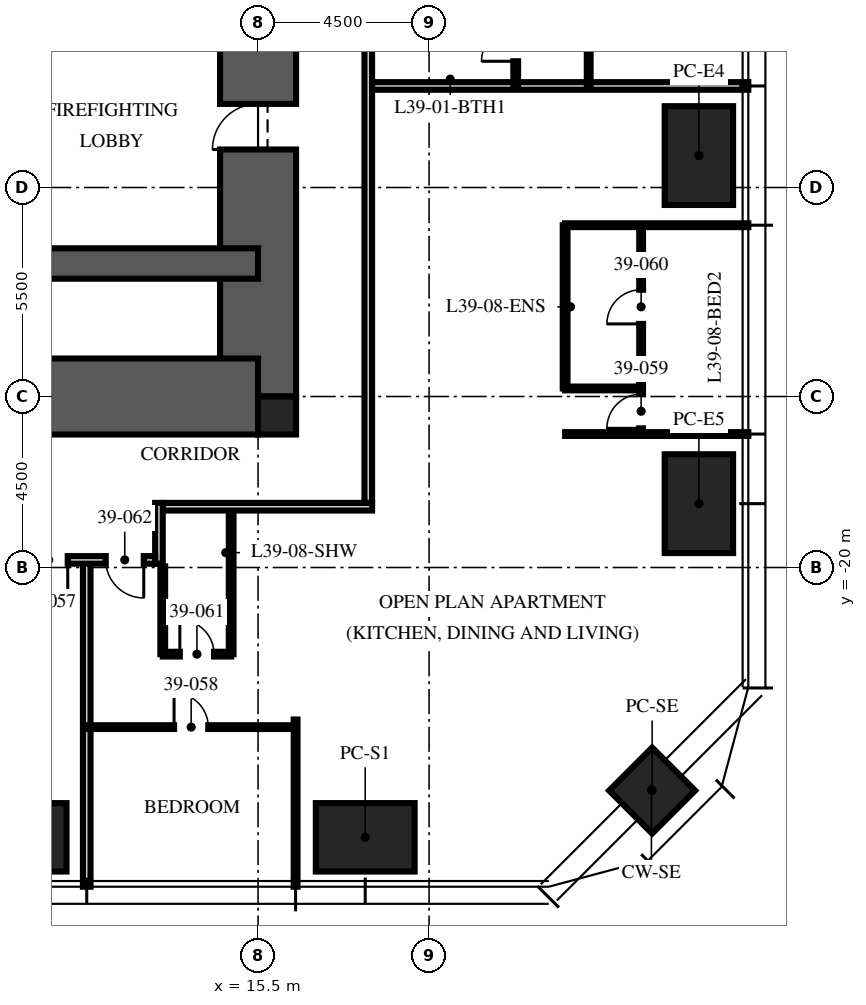
"""IFC4 building model, lengths in metres.
Left out: names, types, materials, properties, quantities, classifications, styles, units other than length and angle.
Written with IfcOpenShell. Run it as: python <this file> out.ifc"""

import sys

from ifc_helpers import new_model, si_unit, direction, frame, frame_2d, origin, origin_2d, place, context, subcontext, project, spatial, rectangle, extrude, element, fill, save


model = new_model("IFC4")
c1 = context("Model", 3, precision=1e-05, world=origin(), true_north=direction((0.0, 1.0)))
c2 = subcontext(c1, "Body", "Model", "MODEL_VIEW")
j1 = project(units=[si_unit("LENGTHUNIT", "METRE"), si_unit("PLANEANGLEUNIT", "RADIAN")], contexts=[c1])
p1 = place(None, origin())
s1 = spatial("IfcSite", under=j1, at=p1, CompositionType="ELEMENT")
p2 = place(p1, origin())
s2 = spatial("IfcBuilding", under=s1, at=p2, CompositionType="ELEMENT")
p3 = place(p2, frame((0.0, 0.0, 156.0)))
s3 = spatial("IfcBuildingStorey", under=s2, at=p3, CompositionType="ELEMENT", Elevation=156.0)
p4 = place(p3, frame((15.5, -15.5, -0.25), z_axis=(0.0, 0.0, 1.0), x_axis=(0.0, 1.0, 0.0)))
e1 = element("IfcWall", 1, at=p4, inside=s3, PredefinedType="SHEAR", context=c2, shape_type="SweptSolid", body=[
    extrude(rectangle(XDim=31.0, YDim=2.0, at=frame_2d((15.5, 0.0))), origin(), (0.0, 0.0, 1.0), 3.75),
])
p5 = place(p4, frame((6.5, 0.0, 0.25)))
e2 = element("IfcOpeningElement", 2, at=p5, cuts=e1, PredefinedType="OPENING", context=c2, shape_type="SweptSolid", body=[
    extrude(rectangle(XDim=1.2, YDim=2.1, at=frame_2d((0.6, 1.05))), frame((0.0, 1.01, 0.0), z_axis=(0.0, -1.0, 0.0), x_axis=(1.0, 0.0, 0.0)), (0.0, 0.0, 1.0), 2.02),
])
p6 = place(p4, frame((23.0, 0.0, 0.25)))
e3 = element("IfcOpeningElement", 3, at=p6, cuts=e1, PredefinedType="OPENING", context=c2, shape_type="SweptSolid", body=[
    extrude(rectangle(XDim=1.8, YDim=2.1, at=frame_2d((0.9, 1.05))), frame((0.0, 1.01, 0.0), z_axis=(0.0, -1.0, 0.0), x_axis=(1.0, 0.0, 0.0)), (0.0, 0.0, 1.0), 2.02),
])
p7 = place(p3, frame((-15.5, -15.5, -0.25), z_axis=(0.0, 0.0, 1.0), x_axis=(1.0, 0.0, 0.0)))
e4 = element("IfcWall", 4, at=p7, inside=s3, PredefinedType="SHEAR", context=c2, shape_type="SweptSolid", body=[
    extrude(rectangle(XDim=31.0, YDim=2.0, at=frame_2d((15.5, 0.0))), origin(), (0.0, 0.0, 1.0), 3.75),
])
p8 = place(p7, frame((10.4, 0.0, 0.25)))
e5 = element("IfcOpeningElement", 5, at=p8, cuts=e4, PredefinedType="OPENING", context=c2, shape_type="SweptSolid", body=[
    extrude(rectangle(XDim=1.1, YDim=2.1, at=frame_2d((0.55, 1.05))), frame((0.0, 1.01, 0.0), z_axis=(0.0, -1.0, 0.0), x_axis=(1.0, 0.0, 0.0)), (0.0, 0.0, 1.0), 2.02),
])
p9 = place(p7, frame((13.5, 0.0, 0.25)))
e6 = element("IfcOpeningElement", 6, at=p9, cuts=e4, PredefinedType="OPENING", context=c2, shape_type="SweptSolid", body=[
    extrude(rectangle(XDim=1.1, YDim=2.1, at=frame_2d((0.55, 1.05))), frame((0.0, 1.01, 0.0), z_axis=(0.0, -1.0, 0.0), x_axis=(1.0, 0.0, 0.0)), (0.0, 0.0, 1.0), 2.02),
])
p10 = place(p7, frame((16.6, 0.0, 0.25)))
e7 = element("IfcOpeningElement", 7, at=p10, cuts=e4, PredefinedType="OPENING", context=c2, shape_type="SweptSolid", body=[
    extrude(rectangle(XDim=1.1, YDim=2.1, at=frame_2d((0.55, 1.05))), frame((0.0, 1.01, 0.0), z_axis=(0.0, -1.0, 0.0), x_axis=(1.0, 0.0, 0.0)), (0.0, 0.0, 1.0), 2.02),
])
p11 = place(p3, frame((-15.5, -12.0, -0.25), z_axis=(0.0, 0.0, 1.0), x_axis=(1.0, 0.0, 0.0)))
e8 = element("IfcWall", 8, at=p11, inside=s3, PredefinedType="SHEAR", context=c2, shape_type="SweptSolid", body=[
    extrude(rectangle(XDim=31.0, YDim=0.8, at=frame_2d((15.5, 0.0))), origin(), (0.0, 0.0, 1.0), 3.75),
])
p12 = place(p3, frame((16.0, -16.0, -0.25), z_axis=(0.0, 0.0, 1.0), x_axis=(1.0, 0.0, 0.0)))
e9 = element("IfcColumn", 9, at=p12, inside=s3, PredefinedType="COLUMN", context=c2, shape_type="SweptSolid", body=[
    extrude(rectangle(XDim=1.0, YDim=1.0, at=origin_2d()), origin(), (0.0, 0.0, 1.0), 3.75),
])
for number, where, z_axis, x_axis in (
    (10, (27.1, -9.16, 0.0), (0.0, 0.0, 1.0), (0.0, 1.0, 0.0)),
    (11, (27.1, -18.32, 0.0), (0.0, 0.0, 1.0), (0.0, 1.0, 0.0)),
    (12, (18.32, -27.1, 0.0), (0.0, 0.0, 1.0), (1.0, 0.0, 0.0)),
    (13, (9.16, -27.1, 0.0), (0.0, 0.0, 1.0), (1.0, 0.0, 0.0)),
):
    element("IfcColumn", number, at=place(p3, frame(where, z_axis=z_axis, x_axis=x_axis)), inside=s3, PredefinedType="COLUMN", context=c2, shape_type="SweptSolid", body=[
        extrude(rectangle(XDim=2.6, YDim=1.8, at=origin_2d()), origin(), (0.0, 0.0, 1.0), 3.75),
    ])
p13 = place(p3, frame((25.87, -25.87, 0.0), z_axis=(0.0, 0.0, 1.0), x_axis=(0.707106781187, 0.707106781187, 0.0)))
e14 = element("IfcColumn", 14, at=p13, inside=s3, PredefinedType="COLUMN", context=c2, shape_type="SweptSolid", body=[
    extrude(rectangle(XDim=1.6, YDim=1.6, at=origin_2d()), origin(), (0.0, 0.0, 1.0), 3.75),
])
p14 = place(p3, frame((18.5, -7.328, 0.0), z_axis=(0.0, 0.0, 1.0), x_axis=(1.0, 0.0, 0.0)))
e15 = element("IfcWall", 15, at=p14, inside=s3, PredefinedType="PARTITIONING", context=c2, shape_type="SweptSolid", body=[
    extrude(rectangle(XDim=9.9, YDim=0.2, at=frame_2d((4.95, 0.0))), origin(), (0.0, 0.0, 1.0), 2.81),
])
p15 = place(p3, frame((10.992, -19.9, 0.0), z_axis=(0.0, 0.0, 1.0), x_axis=(0.0, -1.0, 0.0)))
e16 = element("IfcWall", 16, at=p15, inside=s3, PredefinedType="PARTITIONING", context=c2, shape_type="SweptSolid", body=[
    extrude(rectangle(XDim=8.5, YDim=0.2, at=frame_2d((4.25, 0.0))), origin(), (0.0, 0.0, 1.0), 2.81),
])
p16 = place(p3, frame((16.488, -24.0, 0.0), z_axis=(0.0, 0.0, 1.0), x_axis=(0.0, -1.0, 0.0)))
e17 = element("IfcWall", 17, at=p16, inside=s3, PredefinedType="PARTITIONING", context=c2, shape_type="SweptSolid", body=[
    extrude(rectangle(XDim=4.4, YDim=0.1, at=frame_2d((2.2, 0.0))), origin(), (0.0, 0.0, 1.0), 2.81),
])
for number, where, z_axis, x_axis in (
    (18, (23.58, -16.488, 0.0), (0.0, 0.0, 1.0), (1.0, 0.0, 0.0)),
    (19, (23.58, -10.992, 0.0), (0.0, 0.0, 1.0), (1.0, 0.0, 0.0)),
):
    element("IfcWall", number, at=place(p3, frame(where, z_axis=z_axis, x_axis=x_axis)), inside=s3, PredefinedType="PARTITIONING", context=c2, shape_type="SweptSolid", body=[
        extrude(rectangle(XDim=4.82, YDim=0.1, at=frame_2d((2.41, 0.0))), origin(), (0.0, 0.0, 1.0), 2.81),
    ])
p17 = place(p3, frame((24.2, -7.328, 0.0), z_axis=(0.0, 0.0, 1.0), x_axis=(0.0, 1.0, 0.0)))
e20 = element("IfcWall", 20, at=p17, inside=s3, PredefinedType="PARTITIONING", context=c2, shape_type="SweptSolid", body=[
    extrude(rectangle(XDim=5.496, YDim=0.1, at=frame_2d((2.748, 0.0))), origin(), (0.0, 0.0, 1.0), 2.81),
])
p18 = place(p17, frame((2.298, 0.0, 0.0)))
e21 = element("IfcOpeningElement", 21, at=p18, cuts=e20, PredefinedType="OPENING", context=c2, shape_type="SweptSolid", body=[
    extrude(rectangle(XDim=0.9, YDim=2.1, at=frame_2d((0.45, 1.05))), frame((0.0, 0.06, 0.0), z_axis=(0.0, -1.0, 0.0), x_axis=(1.0, 0.0, 0.0)), (0.0, 0.0, 1.0), 0.12),
])
p19 = place(p3, frame((22.28, -7.328, 0.0), z_axis=(0.0, 0.0, 1.0), x_axis=(0.0, 1.0, 0.0)))
e22 = element("IfcWall", 22, at=p19, inside=s3, PredefinedType="PARTITIONING", context=c2, shape_type="SweptSolid", body=[
    extrude(rectangle(XDim=2.2, YDim=0.125, at=frame_2d((1.1, 0.0))), origin(), (0.0, 0.0, 1.0), 3.5),
])
p20 = place(p19, frame((0.65, 0.0, 0.0)))
e23 = element("IfcOpeningElement", 23, at=p20, cuts=e22, PredefinedType="OPENING", context=c2, shape_type="SweptSolid", body=[
    extrude(rectangle(XDim=0.9, YDim=2.1, at=frame_2d((0.45, 1.05))), frame((0.0, 0.073, 0.0), z_axis=(0.0, -1.0, 0.0), x_axis=(1.0, 0.0, 0.0)), (0.0, 0.0, 1.0), 0.145),
])
p21 = place(p3, frame((10.992, -24.2, 0.0), z_axis=(0.0, 0.0, 1.0), x_axis=(1.0, 0.0, 0.0)))
e24 = element("IfcWall", 24, at=p21, inside=s3, PredefinedType="PARTITIONING", context=c2, shape_type="SweptSolid", body=[
    extrude(rectangle(XDim=5.496, YDim=0.1, at=frame_2d((2.748, 0.0))), origin(), (0.0, 0.0, 1.0), 2.81),
])
p22 = place(p21, frame((2.298, 0.0, 0.0)))
e25 = element("IfcOpeningElement", 25, at=p22, cuts=e24, PredefinedType="OPENING", context=c2, shape_type="SweptSolid", body=[
    extrude(rectangle(XDim=0.9, YDim=2.1, at=frame_2d((0.45, 1.05))), frame((0.0, 0.06, 0.0), z_axis=(0.0, -1.0, 0.0), x_axis=(1.0, 0.0, 0.0)), (0.0, 0.0, 1.0), 0.12),
])
p23 = place(p3, frame((25.58, -16.488, 0.0), z_axis=(0.0, 0.0, 1.0), x_axis=(0.0, 1.0, 0.0)))
e26 = element("IfcWall", 26, at=p23, inside=s3, PredefinedType="PARTITIONING", context=c2, shape_type="SweptSolid", body=[
    extrude(rectangle(XDim=5.496, YDim=0.1, at=frame_2d((2.748, 0.0))), origin(), (0.0, 0.0, 1.0), 2.81),
])
p24 = place(p23, frame((0.15, 0.0, 0.0)))
e27 = element("IfcOpeningElement", 27, at=p24, cuts=e26, PredefinedType="OPENING", context=c2, shape_type="SweptSolid", body=[
    extrude(rectangle(XDim=0.9, YDim=2.1, at=frame_2d((0.45, 1.05))), frame((0.0, 0.06, 0.0), z_axis=(0.0, -1.0, 0.0), x_axis=(1.0, 0.0, 0.0)), (0.0, 0.0, 1.0), 0.12),
])
p25 = place(p23, frame((2.898, 0.0, 0.0)))
e28 = element("IfcOpeningElement", 28, at=p25, cuts=e26, PredefinedType="OPENING", context=c2, shape_type="SweptSolid", body=[
    extrude(rectangle(XDim=0.9, YDim=2.1, at=frame_2d((0.45, 1.05))), frame((0.0, 0.06, 0.0), z_axis=(0.0, -1.0, 0.0), x_axis=(1.0, 0.0, 0.0)), (0.0, 0.0, 1.0), 0.12),
])
p26 = place(p3, frame((23.58, -15.288, 0.0), z_axis=(0.0, 0.0, 1.0), x_axis=(1.0, 0.0, 0.0)))
e29 = element("IfcWall", 29, at=p26, inside=s3, PredefinedType="PARTITIONING", context=c2, shape_type="SweptSolid", body=[
    extrude(rectangle(XDim=2.0, YDim=0.1, at=frame_2d((1.0, 0.0))), origin(), (0.0, 0.0, 1.0), 3.5),
])
p27 = place(p3, frame((23.58, -15.288, 0.0), z_axis=(0.0, 0.0, 1.0), x_axis=(0.0, 1.0, 0.0)))
e30 = element("IfcWall", 30, at=p27, inside=s3, PredefinedType="PARTITIONING", context=c2, shape_type="SweptSolid", body=[
    extrude(rectangle(XDim=4.296, YDim=0.125, at=frame_2d((2.148, 0.0))), origin(), (0.0, 0.0, 1.0), 2.81),
])
p28 = place(p3, frame((12.992, -22.28, 0.0), z_axis=(0.0, 0.0, 1.0), x_axis=(1.0, 0.0, 0.0)))
e31 = element("IfcWall", 31, at=p28, inside=s3, PredefinedType="PARTITIONING", context=c2, shape_type="SweptSolid", body=[
    extrude(rectangle(XDim=1.8, YDim=0.125, at=frame_2d((0.9, 0.0))), origin(), (0.0, 0.0, 1.0), 2.81),
])
p29 = place(p28, frame((0.45, 0.0, 0.0)))
e32 = element("IfcOpeningElement", 32, at=p29, cuts=e31, PredefinedType="OPENING", context=c2, shape_type="SweptSolid", body=[
    extrude(rectangle(XDim=0.9, YDim=2.1, at=frame_2d((0.45, 1.05))), frame((0.0, 0.073, 0.0), z_axis=(0.0, -1.0, 0.0), x_axis=(1.0, 0.0, 0.0)), (0.0, 0.0, 1.0), 0.145),
])
p30 = place(p3, frame((12.992, -19.97, 0.0), z_axis=(0.0, 0.0, 1.0), x_axis=(0.0, -1.0, 0.0)))
e33 = element("IfcWall", 33, at=p30, inside=s3, PredefinedType="PARTITIONING", context=c2, shape_type="SweptSolid", body=[
    extrude(rectangle(XDim=2.31, YDim=0.125, at=frame_2d((1.155, 0.0))), origin(), (0.0, 0.0, 1.0), 3.5),
])
p31 = place(p3, frame((14.792, -18.5, 0.0), z_axis=(0.0, 0.0, 1.0), x_axis=(0.0, -1.0, 0.0)))
e34 = element("IfcWall", 34, at=p31, inside=s3, PredefinedType="PARTITIONING", context=c2, shape_type="SweptSolid", body=[
    extrude(rectangle(XDim=3.78, YDim=0.125, at=frame_2d((1.89, 0.0))), origin(), (0.0, 0.0, 1.0), 3.5),
])
p32 = place(p3, frame((18.4, -18.3, 0.0), z_axis=(0.0, 0.0, 1.0), x_axis=(0.0, 1.0, 0.0)))
e35 = element("IfcWall", 35, at=p32, inside=s3, PredefinedType="PARTITIONING", context=c2, shape_type="SweptSolid", body=[
    extrude(rectangle(XDim=18.132, YDim=0.2, at=frame_2d((9.066, 0.0))), origin(), (0.0, 0.0, 1.0), 2.3),
])
p33 = place(p3, frame((18.5, -18.4, 0.0), z_axis=(0.0, 0.0, 1.0), x_axis=(-1.0, 0.0, 0.0)))
e36 = element("IfcWall", 36, at=p33, inside=s3, PredefinedType="PARTITIONING", context=c2, shape_type="SweptSolid", body=[
    extrude(rectangle(XDim=5.508, YDim=0.2, at=frame_2d((2.754, 0.0))), origin(), (0.0, 0.0, 1.0), 2.3),
])
p34 = place(p3, frame((12.892, -18.3, 0.0), z_axis=(0.0, 0.0, 1.0), x_axis=(0.0, -1.0, 0.0)))
e37 = element("IfcWall", 37, at=p34, inside=s3, PredefinedType="PARTITIONING", context=c2, shape_type="SweptSolid", body=[
    extrude(rectangle(XDim=1.6, YDim=0.2, at=frame_2d((0.8, 0.0))), origin(), (0.0, 0.0, 1.0), 3.5),
])
p35 = place(p3, frame((12.792, -19.8, 0.0), z_axis=(0.0, 0.0, 1.0), x_axis=(-1.0, 0.0, 0.0)))
e38 = element("IfcWall", 38, at=p35, inside=s3, PredefinedType="PARTITIONING", context=c2, shape_type="SweptSolid", body=[
    extrude(rectangle(XDim=3.6, YDim=0.2, at=frame_2d((1.8, 0.0))), origin(), (0.0, 0.0, 1.0), 2.7),
])
p36 = place(p35, frame((2.3, 0.0, 0.0)))
e39 = element("IfcOpeningElement", 39, at=p36, cuts=e38, PredefinedType="OPENING", context=c2, shape_type="SweptSolid", body=[
    extrude(rectangle(XDim=1.0, YDim=2.2, at=frame_2d((0.5, 1.1))), frame((0.0, 0.11, 0.0), z_axis=(0.0, -1.0, 0.0), x_axis=(1.0, 0.0, 0.0)), (0.0, 0.0, 1.0), 0.22),
])
p37 = place(p35, frame((0.3, 0.0, 0.0)))
e40 = element("IfcOpeningElement", 40, at=p37, cuts=e38, PredefinedType="OPENING", context=c2, shape_type="SweptSolid", body=[
    extrude(rectangle(XDim=1.0, YDim=2.2, at=frame_2d((0.5, 1.1))), frame((0.0, 0.11, 0.0), z_axis=(0.0, -1.0, 0.0), x_axis=(1.0, 0.0, 0.0)), (0.0, 0.0, 1.0), 0.22),
])
p38 = place(p5, origin())
e41 = element("IfcDoor", 41, at=p38, inside=s3, OperationType="SINGLE_SWING_LEFT", PredefinedType="DOOR", context=c2, shape_type="SweptSolid", body=[
    extrude(rectangle(XDim=1.2, YDim=2.1, at=frame_2d((0.6, 1.05))), frame((0.0, 0.025, 0.0), z_axis=(0.0, -1.0, 0.0), x_axis=(1.0, 0.0, 0.0)), (0.0, 0.0, 1.0), 0.05),
])
fill(e2, e41)
p39 = place(p20, origin())
e42 = element("IfcDoor", 42, at=p39, inside=s3, OperationType="SINGLE_SWING_LEFT", PredefinedType="DOOR", context=c2, shape_type="SweptSolid", body=[
    extrude(rectangle(XDim=0.9, YDim=2.1, at=frame_2d((0.45, 1.05))), frame((0.0, 0.025, 0.0), z_axis=(0.0, -1.0, 0.0), x_axis=(1.0, 0.0, 0.0)), (0.0, 0.0, 1.0), 0.05),
])
fill(e23, e42)
p40 = place(p36, origin())
e43 = element("IfcDoor", 43, at=p40, inside=s3, OperationType="SINGLE_SWING_LEFT", PredefinedType="DOOR", context=c2, shape_type="SweptSolid", body=[
    extrude(rectangle(XDim=1.0, YDim=2.2, at=frame_2d((0.5, 1.1))), frame((0.0, 0.025, 0.0), z_axis=(0.0, -1.0, 0.0), x_axis=(1.0, 0.0, 0.0)), (0.0, 0.0, 1.0), 0.05),
])
fill(e39, e43)
p41 = place(p22, origin())
e44 = element("IfcDoor", 44, at=p41, inside=s3, OperationType="SINGLE_SWING_LEFT", PredefinedType="DOOR", context=c2, shape_type="SweptSolid", body=[
    extrude(rectangle(XDim=0.9, YDim=2.1, at=frame_2d((0.45, 1.05))), frame((0.0, 0.025, 0.0), z_axis=(0.0, -1.0, 0.0), x_axis=(1.0, 0.0, 0.0)), (0.0, 0.0, 1.0), 0.05),
])
fill(e25, e44)
p42 = place(p24, origin())
e45 = element("IfcDoor", 45, at=p42, inside=s3, OperationType="SINGLE_SWING_LEFT", PredefinedType="DOOR", context=c2, shape_type="SweptSolid", body=[
    extrude(rectangle(XDim=0.9, YDim=2.1, at=frame_2d((0.45, 1.05))), frame((0.0, 0.025, 0.0), z_axis=(0.0, -1.0, 0.0), x_axis=(1.0, 0.0, 0.0)), (0.0, 0.0, 1.0), 0.05),
])
fill(e27, e45)
p43 = place(p25, origin())
e46 = element("IfcDoor", 46, at=p43, inside=s3, OperationType="SINGLE_SWING_LEFT", PredefinedType="DOOR", context=c2, shape_type="SweptSolid", body=[
    extrude(rectangle(XDim=0.9, YDim=2.1, at=frame_2d((0.45, 1.05))), frame((0.0, 0.025, 0.0), z_axis=(0.0, -1.0, 0.0), x_axis=(1.0, 0.0, 0.0)), (0.0, 0.0, 1.0), 0.05),
])
fill(e28, e46)
p44 = place(p29, origin())
e47 = element("IfcDoor", 47, at=p44, inside=s3, OperationType="SINGLE_SWING_LEFT", PredefinedType="DOOR", context=c2, shape_type="SweptSolid", body=[
    extrude(rectangle(XDim=0.9, YDim=2.1, at=frame_2d((0.45, 1.05))), frame((0.0, 0.025, 0.0), z_axis=(0.0, -1.0, 0.0), x_axis=(1.0, 0.0, 0.0)), (0.0, 0.0, 1.0), 0.05),
])
fill(e32, e47)
p45 = place(p37, origin())
e48 = element("IfcDoor", 48, at=p45, inside=s3, OperationType="SINGLE_SWING_LEFT", PredefinedType="DOOR", context=c2, shape_type="SweptSolid", body=[
    extrude(rectangle(XDim=1.0, YDim=2.2, at=frame_2d((0.5, 1.1))), frame((0.0, 0.025, 0.0), z_axis=(0.0, -1.0, 0.0), x_axis=(1.0, 0.0, 0.0)), (0.0, 0.0, 1.0), 0.05),
])
fill(e40, e48)
save(model, sys.argv[1])
